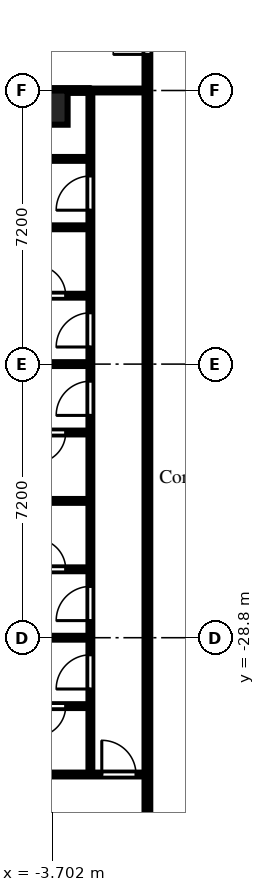
"""IFC4 building model, lengths in metres.
Left out: names, types, materials, properties, quantities, classifications, styles, units other than length and angle.
Written with IfcOpenShell. Run it as: python <this file> out.ifc"""

import sys

from ifc_helpers import new_model, si_unit, direction, frame, frame_2d, origin, origin_2d, place, context, subcontext, project, spatial, rectangle, extrude, element, fill, save


model = new_model("IFC4")
c1 = context("Model", 3, precision=1e-05, world=origin(), true_north=direction((0.0, 1.0)))
c2 = subcontext(c1, "Body", "Model", "MODEL_VIEW")
j1 = project(units=[si_unit("LENGTHUNIT", "METRE"), si_unit("PLANEANGLEUNIT", "RADIAN")], contexts=[c1])
p1 = place(None, origin())
s1 = spatial("IfcSite", under=j1, at=p1, CompositionType="ELEMENT")
p2 = place(p1, origin())
s2 = spatial("IfcBuilding", under=s1, at=p2, CompositionType="ELEMENT")
p3 = place(p2, frame((0.0, 0.0, 69.9)))
s3 = spatial("IfcBuildingStorey", under=s2, at=p3, CompositionType="ELEMENT", Elevation=69.9)
p4 = place(p3, frame((-3.75, -14.85, 0.0), z_axis=(0.0, 0.0, 1.0), x_axis=(1.0, 0.0, 0.0)))
e1 = element("IfcColumn", 1, at=p4, inside=s3, PredefinedType="COLUMN", context=c2, shape_type="SweptSolid", body=[
    extrude(rectangle(XDim=0.9, YDim=0.9, at=origin_2d()), origin(), (0.0, 0.0, 1.0), 3.0),
])
p5 = place(p3, frame((-6.9, -32.4, 0.0), z_axis=(0.0, 0.0, 1.0), x_axis=(1.0, 0.0, 0.0)))
e2 = element("IfcWall", 2, at=p5, inside=s3, PredefinedType="PARTITIONING", context=c2, shape_type="SweptSolid", body=[
    extrude(rectangle(XDim=5.625, YDim=0.1, at=frame_2d((2.812, 0.0))), origin(), (0.0, 0.0, 1.0), 2.575),
])
p6 = place(p5, frame((4.5, 0.0, 0.0)))
e3 = element("IfcOpeningElement", 3, at=p6, cuts=e2, PredefinedType="OPENING", context=c2, shape_type="SweptSolid", body=[
    extrude(rectangle(XDim=0.9, YDim=2.1, at=frame_2d((0.45, 1.05))), frame((0.0, 0.06, 0.0), z_axis=(0.0, -1.0, 0.0), x_axis=(1.0, 0.0, 0.0)), (0.0, 0.0, 1.0), 0.12),
])
for number, where, z_axis, x_axis in (
    (4, (-6.9, -28.8, 0.0), (0.0, 0.0, 1.0), (1.0, 0.0, 0.0)),
    (5, (-6.9, -25.2, 0.0), (0.0, 0.0, 1.0), (1.0, 0.0, 0.0)),
    (6, (-6.9, -21.6, 0.0), (0.0, 0.0, 1.0), (1.0, 0.0, 0.0)),
    (7, (-6.9, -18.0, 0.0), (0.0, 0.0, 1.0), (1.0, 0.0, 0.0)),
):
    element("IfcWall", number, at=place(p3, frame(where, z_axis=z_axis, x_axis=x_axis)), inside=s3, PredefinedType="PARTITIONING", context=c2, shape_type="SweptSolid", body=[
        extrude(rectangle(XDim=4.15, YDim=0.1, at=frame_2d((2.075, 0.0))), origin(), (0.0, 0.0, 1.0), 2.575),
    ])
p7 = place(p3, frame((-4.75, -30.6, 0.0), z_axis=(0.0, 0.0, 1.0), x_axis=(1.0, 0.0, 0.0)))
e8 = element("IfcWall", 8, at=p7, inside=s3, PredefinedType="PARTITIONING", context=c2, shape_type="SweptSolid", body=[
    extrude(rectangle(XDim=2.0, YDim=0.1, at=frame_2d((1.0, 0.0))), origin(), (0.0, 0.0, 1.0), 2.575),
])
p8 = place(p7, frame((0.6, 0.0, 0.0)))
e9 = element("IfcOpeningElement", 9, at=p8, cuts=e8, PredefinedType="OPENING", context=c2, shape_type="SweptSolid", body=[
    extrude(rectangle(XDim=0.8, YDim=2.1, at=frame_2d((0.4, 1.05))), frame((0.0, 0.06, 0.0), z_axis=(0.0, -1.0, 0.0), x_axis=(1.0, 0.0, 0.0)), (0.0, 0.0, 1.0), 0.12),
])
p9 = place(p3, frame((-4.75, -27.0, 0.0), z_axis=(0.0, 0.0, 1.0), x_axis=(1.0, 0.0, 0.0)))
e10 = element("IfcWall", 10, at=p9, inside=s3, PredefinedType="PARTITIONING", context=c2, shape_type="SweptSolid", body=[
    extrude(rectangle(XDim=2.0, YDim=0.1, at=frame_2d((1.0, 0.0))), origin(), (0.0, 0.0, 1.0), 2.575),
])
p10 = place(p9, frame((0.6, 0.0, 0.0)))
e11 = element("IfcOpeningElement", 11, at=p10, cuts=e10, PredefinedType="OPENING", context=c2, shape_type="SweptSolid", body=[
    extrude(rectangle(XDim=0.8, YDim=2.1, at=frame_2d((0.4, 1.05))), frame((0.0, 0.06, 0.0), z_axis=(0.0, -1.0, 0.0), x_axis=(1.0, 0.0, 0.0)), (0.0, 0.0, 1.0), 0.12),
])
p11 = place(p3, frame((-4.75, -23.4, 0.0), z_axis=(0.0, 0.0, 1.0), x_axis=(1.0, 0.0, 0.0)))
e12 = element("IfcWall", 12, at=p11, inside=s3, PredefinedType="PARTITIONING", context=c2, shape_type="SweptSolid", body=[
    extrude(rectangle(XDim=2.0, YDim=0.1, at=frame_2d((1.0, 0.0))), origin(), (0.0, 0.0, 1.0), 2.575),
])
p12 = place(p11, frame((0.6, 0.0, 0.0)))
e13 = element("IfcOpeningElement", 13, at=p12, cuts=e12, PredefinedType="OPENING", context=c2, shape_type="SweptSolid", body=[
    extrude(rectangle(XDim=0.8, YDim=2.1, at=frame_2d((0.4, 1.05))), frame((0.0, 0.06, 0.0), z_axis=(0.0, -1.0, 0.0), x_axis=(1.0, 0.0, 0.0)), (0.0, 0.0, 1.0), 0.12),
])
p13 = place(p3, frame((-4.75, -19.8, 0.0), z_axis=(0.0, 0.0, 1.0), x_axis=(1.0, 0.0, 0.0)))
e14 = element("IfcWall", 14, at=p13, inside=s3, PredefinedType="PARTITIONING", context=c2, shape_type="SweptSolid", body=[
    extrude(rectangle(XDim=2.0, YDim=0.1, at=frame_2d((1.0, 0.0))), origin(), (0.0, 0.0, 1.0), 2.575),
])
p14 = place(p13, frame((0.6, 0.0, 0.0)))
e15 = element("IfcOpeningElement", 15, at=p14, cuts=e14, PredefinedType="OPENING", context=c2, shape_type="SweptSolid", body=[
    extrude(rectangle(XDim=0.8, YDim=2.1, at=frame_2d((0.4, 1.05))), frame((0.0, 0.06, 0.0), z_axis=(0.0, -1.0, 0.0), x_axis=(1.0, 0.0, 0.0)), (0.0, 0.0, 1.0), 0.12),
])
p15 = place(p3, frame((-4.75, -16.2, 0.0), z_axis=(0.0, 0.0, 1.0), x_axis=(1.0, 0.0, 0.0)))
e16 = element("IfcWall", 16, at=p15, inside=s3, PredefinedType="PARTITIONING", context=c2, shape_type="SweptSolid", body=[
    extrude(rectangle(XDim=2.0, YDim=0.1, at=frame_2d((1.0, 0.0))), origin(), (0.0, 0.0, 1.0), 2.575),
])
p16 = place(p3, frame((-3.9, -14.4, 0.0), z_axis=(0.0, 0.0, 1.0), x_axis=(1.0, 0.0, 0.0)))
e17 = element("IfcWall", 17, at=p16, inside=s3, PredefinedType="PARTITIONING", context=c2, shape_type="SweptSolid", body=[
    extrude(rectangle(XDim=1.2, YDim=0.125, at=frame_2d((0.6, 0.0))), origin(), (0.0, 0.0, 1.0), 2.575),
])
p17 = place(p3, frame((-2.7, -32.35, 0.0), z_axis=(0.0, 0.0, 1.0), x_axis=(0.0, 1.0, 0.0)))
e18 = element("IfcWall", 18, at=p17, inside=s3, PredefinedType="PARTITIONING", context=c2, shape_type="SweptSolid", body=[
    extrude(rectangle(XDim=17.888, YDim=0.1, at=frame_2d((8.944, 0.0))), origin(), (0.0, 0.0, 1.0), 2.575),
])
p18 = place(p17, frame((2.2, 0.0, 0.0)))
e19 = element("IfcOpeningElement", 19, at=p18, cuts=e18, PredefinedType="OPENING", context=c2, shape_type="SweptSolid", body=[
    extrude(rectangle(XDim=0.9, YDim=2.1, at=frame_2d((0.45, 1.05))), frame((0.0, 0.06, 0.0), z_axis=(0.0, -1.0, 0.0), x_axis=(1.0, 0.0, 0.0)), (0.0, 0.0, 1.0), 0.12),
])
p19 = place(p17, frame((4.0, 0.0, 0.0)))
e20 = element("IfcOpeningElement", 20, at=p19, cuts=e18, PredefinedType="OPENING", context=c2, shape_type="SweptSolid", body=[
    extrude(rectangle(XDim=0.9, YDim=2.1, at=frame_2d((0.45, 1.05))), frame((0.0, 0.06, 0.0), z_axis=(0.0, -1.0, 0.0), x_axis=(1.0, 0.0, 0.0)), (0.0, 0.0, 1.0), 0.12),
])
p20 = place(p17, frame((9.4, 0.0, 0.0)))
e21 = element("IfcOpeningElement", 21, at=p20, cuts=e18, PredefinedType="OPENING", context=c2, shape_type="SweptSolid", body=[
    extrude(rectangle(XDim=0.9, YDim=2.1, at=frame_2d((0.45, 1.05))), frame((0.0, 0.06, 0.0), z_axis=(0.0, -1.0, 0.0), x_axis=(1.0, 0.0, 0.0)), (0.0, 0.0, 1.0), 0.12),
])
p21 = place(p17, frame((11.2, 0.0, 0.0)))
e22 = element("IfcOpeningElement", 22, at=p21, cuts=e18, PredefinedType="OPENING", context=c2, shape_type="SweptSolid", body=[
    extrude(rectangle(XDim=0.9, YDim=2.1, at=frame_2d((0.45, 1.05))), frame((0.0, 0.06, 0.0), z_axis=(0.0, -1.0, 0.0), x_axis=(1.0, 0.0, 0.0)), (0.0, 0.0, 1.0), 0.12),
])
p22 = place(p17, frame((14.8, 0.0, 0.0)))
e23 = element("IfcOpeningElement", 23, at=p22, cuts=e18, PredefinedType="OPENING", context=c2, shape_type="SweptSolid", body=[
    extrude(rectangle(XDim=0.9, YDim=2.1, at=frame_2d((0.45, 1.05))), frame((0.0, 0.06, 0.0), z_axis=(0.0, -1.0, 0.0), x_axis=(1.0, 0.0, 0.0)), (0.0, 0.0, 1.0), 0.12),
])
p23 = place(p3, frame((-2.7, -14.4, 0.0), z_axis=(0.0, 0.0, 1.0), x_axis=(1.0, 0.0, 0.0)))
e24 = element("IfcWall", 24, at=p23, inside=s3, PredefinedType="PARTITIONING", context=c2, shape_type="SweptSolid", body=[
    extrude(rectangle(XDim=1.425, YDim=0.1, at=frame_2d((0.712, 0.0))), origin(), (0.0, 0.0, 1.0), 2.575),
])
p24 = place(p3, frame((-1.2, -36.5, 0.0), z_axis=(0.0, 0.0, 1.0), x_axis=(0.0, 1.0, 0.0)))
e25 = element("IfcWall", 25, at=p24, inside=s3, PredefinedType="PARTITIONING", context=c2, shape_type="SweptSolid", body=[
    extrude(rectangle(XDim=35.225, YDim=0.15, at=frame_2d((17.613, 0.0))), origin(), (0.0, 0.0, 1.0), 2.575),
])
p25 = place(p24, frame((31.85, 0.0, 0.0)))
e26 = element("IfcOpeningElement", 26, at=p25, cuts=e25, PredefinedType="OPENING", context=c2, shape_type="SweptSolid", body=[
    extrude(rectangle(XDim=0.9, YDim=2.1, at=frame_2d((0.45, 1.05))), frame((0.0, 0.085, 0.0), z_axis=(0.0, -1.0, 0.0), x_axis=(1.0, 0.0, 0.0)), (0.0, 0.0, 1.0), 0.17),
])
p26 = place(p24, frame((23.05, 0.0, 0.0)))
e27 = element("IfcOpeningElement", 27, at=p26, cuts=e25, PredefinedType="OPENING", context=c2, shape_type="SweptSolid", body=[
    extrude(rectangle(XDim=0.9, YDim=2.1, at=frame_2d((0.45, 1.05))), frame((0.0, 0.085, 0.0), z_axis=(0.0, -1.0, 0.0), x_axis=(1.0, 0.0, 0.0)), (0.0, 0.0, 1.0), 0.17),
])
p27 = place(p24, frame((26.65, 0.0, 0.0)))
e28 = element("IfcOpeningElement", 28, at=p27, cuts=e25, PredefinedType="OPENING", context=c2, shape_type="SweptSolid", body=[
    extrude(rectangle(XDim=0.9, YDim=2.1, at=frame_2d((0.45, 1.05))), frame((0.0, 0.085, 0.0), z_axis=(0.0, -1.0, 0.0), x_axis=(1.0, 0.0, 0.0)), (0.0, 0.0, 1.0), 0.17),
])
p28 = place(p24, frame((1.55, 0.0, 0.0)))
e29 = element("IfcOpeningElement", 29, at=p28, cuts=e25, PredefinedType="OPENING", context=c2, shape_type="SweptSolid", body=[
    extrude(rectangle(XDim=1.0, YDim=2.1, at=frame_2d((0.5, 1.05))), frame((0.0, 0.085, 0.0), z_axis=(0.0, -1.0, 0.0), x_axis=(1.0, 0.0, 0.0)), (0.0, 0.0, 1.0), 0.17),
])
p29 = place(p26, origin())
e30 = element("IfcDoor", 30, at=p29, inside=s3, OperationType="SINGLE_SWING_LEFT", PredefinedType="DOOR", context=c2, shape_type="SweptSolid", body=[
    extrude(rectangle(XDim=0.9, YDim=2.1, at=frame_2d((0.45, 1.05))), frame((0.0, 0.025, 0.0), z_axis=(0.0, -1.0, 0.0), x_axis=(1.0, 0.0, 0.0)), (0.0, 0.0, 1.0), 0.05),
])
fill(e27, e30)
p30 = place(p18, origin())
e31 = element("IfcDoor", 31, at=p30, inside=s3, OperationType="SINGLE_SWING_LEFT", PredefinedType="DOOR", context=c2, shape_type="SweptSolid", body=[
    extrude(rectangle(XDim=0.9, YDim=2.1, at=frame_2d((0.45, 1.05))), frame((0.0, 0.025, 0.0), z_axis=(0.0, -1.0, 0.0), x_axis=(1.0, 0.0, 0.0)), (0.0, 0.0, 1.0), 0.05),
])
fill(e19, e31)
p31 = place(p19, origin())
e32 = element("IfcDoor", 32, at=p31, inside=s3, OperationType="SINGLE_SWING_LEFT", PredefinedType="DOOR", context=c2, shape_type="SweptSolid", body=[
    extrude(rectangle(XDim=0.9, YDim=2.1, at=frame_2d((0.45, 1.05))), frame((0.0, 0.025, 0.0), z_axis=(0.0, -1.0, 0.0), x_axis=(1.0, 0.0, 0.0)), (0.0, 0.0, 1.0), 0.05),
])
fill(e20, e32)
p32 = place(p20, origin())
e33 = element("IfcDoor", 33, at=p32, inside=s3, OperationType="SINGLE_SWING_LEFT", PredefinedType="DOOR", context=c2, shape_type="SweptSolid", body=[
    extrude(rectangle(XDim=0.9, YDim=2.1, at=frame_2d((0.45, 1.05))), frame((0.0, 0.025, 0.0), z_axis=(0.0, -1.0, 0.0), x_axis=(1.0, 0.0, 0.0)), (0.0, 0.0, 1.0), 0.05),
])
fill(e21, e33)
p33 = place(p21, origin())
e34 = element("IfcDoor", 34, at=p33, inside=s3, OperationType="SINGLE_SWING_LEFT", PredefinedType="DOOR", context=c2, shape_type="SweptSolid", body=[
    extrude(rectangle(XDim=0.9, YDim=2.1, at=frame_2d((0.45, 1.05))), frame((0.0, 0.025, 0.0), z_axis=(0.0, -1.0, 0.0), x_axis=(1.0, 0.0, 0.0)), (0.0, 0.0, 1.0), 0.05),
])
fill(e22, e34)
p34 = place(p22, origin())
e35 = element("IfcDoor", 35, at=p34, inside=s3, OperationType="SINGLE_SWING_LEFT", PredefinedType="DOOR", context=c2, shape_type="SweptSolid", body=[
    extrude(rectangle(XDim=0.9, YDim=2.1, at=frame_2d((0.45, 1.05))), frame((0.0, 0.025, 0.0), z_axis=(0.0, -1.0, 0.0), x_axis=(1.0, 0.0, 0.0)), (0.0, 0.0, 1.0), 0.05),
])
fill(e23, e35)
p35 = place(p6, origin())
e36 = element("IfcDoor", 36, at=p35, inside=s3, OperationType="SINGLE_SWING_LEFT", PredefinedType="DOOR", context=c2, shape_type="SweptSolid", body=[
    extrude(rectangle(XDim=0.9, YDim=2.1, at=frame_2d((0.45, 1.05))), frame((0.0, 0.025, 0.0), z_axis=(0.0, -1.0, 0.0), x_axis=(1.0, 0.0, 0.0)), (0.0, 0.0, 1.0), 0.05),
])
fill(e3, e36)
p36 = place(p14, origin())
e37 = element("IfcDoor", 37, at=p36, inside=s3, OperationType="SINGLE_SWING_LEFT", PredefinedType="DOOR", context=c2, shape_type="SweptSolid", body=[
    extrude(rectangle(XDim=0.8, YDim=2.1, at=frame_2d((0.4, 1.05))), frame((0.0, 0.025, 0.0), z_axis=(0.0, -1.0, 0.0), x_axis=(1.0, 0.0, 0.0)), (0.0, 0.0, 1.0), 0.05),
])
fill(e15, e37)
p37 = place(p12, frame((0.8, 0.0, 0.0), z_axis=(0.0, 0.0, 1.0), x_axis=(-1.0, 0.0, 0.0)))
e38 = element("IfcDoor", 38, at=p37, inside=s3, OperationType="SINGLE_SWING_RIGHT", PredefinedType="DOOR", context=c2, shape_type="SweptSolid", body=[
    extrude(rectangle(XDim=0.8, YDim=2.1, at=frame_2d((0.4, 1.05))), frame((0.0, 0.025, 0.0), z_axis=(0.0, -1.0, 0.0), x_axis=(1.0, 0.0, 0.0)), (0.0, 0.0, 1.0), 0.05),
])
fill(e13, e38)
p38 = place(p10, origin())
e39 = element("IfcDoor", 39, at=p38, inside=s3, OperationType="SINGLE_SWING_LEFT", PredefinedType="DOOR", context=c2, shape_type="SweptSolid", body=[
    extrude(rectangle(XDim=0.8, YDim=2.1, at=frame_2d((0.4, 1.05))), frame((0.0, 0.025, 0.0), z_axis=(0.0, -1.0, 0.0), x_axis=(1.0, 0.0, 0.0)), (0.0, 0.0, 1.0), 0.05),
])
fill(e11, e39)
p39 = place(p8, frame((0.8, 0.0, 0.0), z_axis=(0.0, 0.0, 1.0), x_axis=(-1.0, 0.0, 0.0)))
e40 = element("IfcDoor", 40, at=p39, inside=s3, OperationType="SINGLE_SWING_RIGHT", PredefinedType="DOOR", context=c2, shape_type="SweptSolid", body=[
    extrude(rectangle(XDim=0.8, YDim=2.1, at=frame_2d((0.4, 1.05))), frame((0.0, 0.025, 0.0), z_axis=(0.0, -1.0, 0.0), x_axis=(1.0, 0.0, 0.0)), (0.0, 0.0, 1.0), 0.05),
])
fill(e9, e40)
save(model, sys.argv[1])
